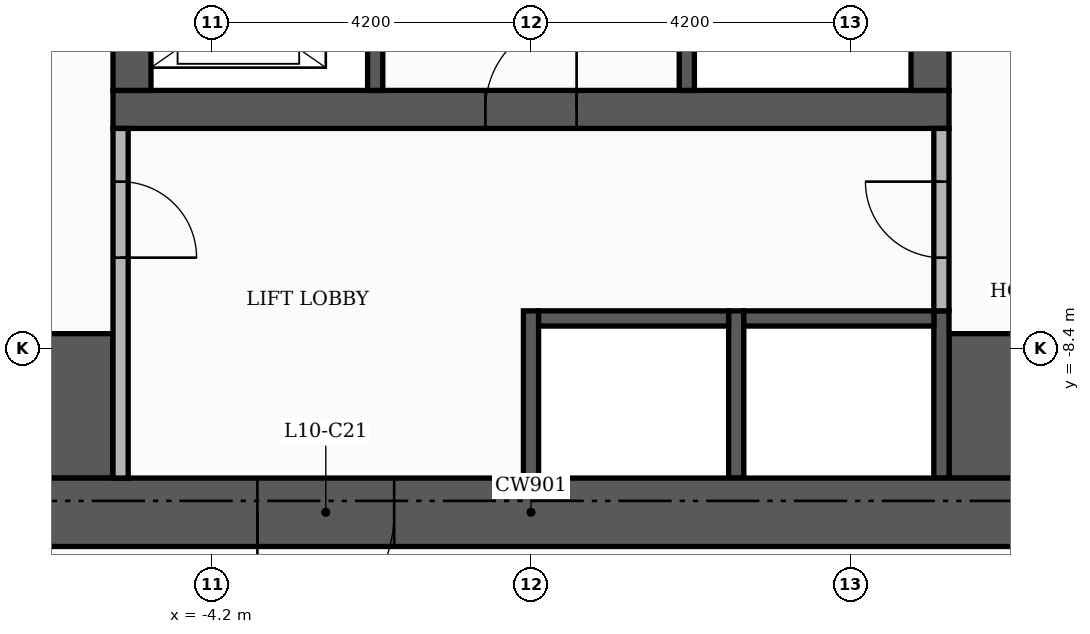
"""IFC4 building model, lengths in metres.
Left out: names, types, materials, properties, quantities, classifications, styles, units other than length and angle.
Written with IfcOpenShell. Run it as: python <this file> out.ifc"""

import sys

from ifc_helpers import new_model, si_unit, direction, frame, frame_2d, origin, place, context, subcontext, project, spatial, rectangle, extrude, element, fill, save


model = new_model("IFC4")
c1 = context("Model", 3, precision=1e-05, world=origin(), true_north=direction((0.0, 1.0)))
c2 = subcontext(c1, "Body", "Model", "MODEL_VIEW")
j1 = project(units=[si_unit("LENGTHUNIT", "METRE"), si_unit("PLANEANGLEUNIT", "RADIAN")], contexts=[c1])
p1 = place(None, origin())
s1 = spatial("IfcSite", under=j1, at=p1, CompositionType="ELEMENT")
p2 = place(p1, origin())
s2 = spatial("IfcBuilding", under=s1, at=p2, CompositionType="ELEMENT")
p3 = place(p2, frame((0.0, 0.0, 46.5)))
s3 = spatial("IfcBuildingStorey", under=s2, at=p3, CompositionType="ELEMENT", Elevation=46.5)
p4 = place(p3, frame((-5.5, -5.25, 0.0), z_axis=(0.0, 0.0, 1.0), x_axis=(1.0, 0.0, 0.0)))
e1 = element("IfcWall", 1, at=p4, inside=s3, PredefinedType="SHEAR", context=c2, shape_type="SweptSolid", body=[
    extrude(rectangle(XDim=11.0, YDim=0.5, at=frame_2d((5.5, 0.0))), origin(), (0.0, 0.0, 1.0), 3.48),
])
p5 = place(p4, frame((4.9, 0.0, 0.0)))
e2 = element("IfcOpeningElement", 2, at=p5, cuts=e1, PredefinedType="OPENING", context=c2, shape_type="SweptSolid", body=[
    extrude(rectangle(XDim=1.2, YDim=2.1, at=frame_2d((0.6, 1.05))), frame((0.0, 0.26, 0.0), z_axis=(0.0, -1.0, 0.0), x_axis=(1.0, 0.0, 0.0)), (0.0, 0.0, 1.0), 0.52),
])
for number, where, z_axis, x_axis in (
    (3, (-5.25, -5.0, 0.0), (0.0, 0.0, 1.0), (0.0, 1.0, 0.0)),
    (4, (5.25, -5.0, 0.0), (0.0, 0.0, 1.0), (0.0, 1.0, 0.0)),
):
    element("IfcWall", number, at=place(p3, frame(where, z_axis=z_axis, x_axis=x_axis)), inside=s3, PredefinedType="SHEAR", context=c2, shape_type="SweptSolid", body=[
        extrude(rectangle(XDim=10.5, YDim=0.5, at=frame_2d((5.25, 0.0))), origin(), (0.0, 0.0, 1.0), 3.48),
    ])
for number, where, z_axis, x_axis in (
    (5, (-10.1, -9.15, 0.0), (0.0, 0.0, 1.0), (1.0, 0.0, 0.0)),
    (6, (5.5, -9.15, 0.0), (0.0, 0.0, 1.0), (1.0, 0.0, 0.0)),
):
    element("IfcWall", number, at=place(p3, frame(where, z_axis=z_axis, x_axis=x_axis)), inside=s3, PredefinedType="SHEAR", context=c2, shape_type="SweptSolid", body=[
        extrude(rectangle(XDim=4.6, YDim=1.9, at=frame_2d((2.3, 0.0))), origin(), (0.0, 0.0, 1.0), 3.48),
    ])
p6 = place(p3, frame((2.05, -5.0, 0.0), z_axis=(0.0, 0.0, 1.0), x_axis=(0.0, 1.0, 0.0)))
e7 = element("IfcWall", 7, at=p6, inside=s3, PredefinedType="SHEAR", context=c2, shape_type="SweptSolid", body=[
    extrude(rectangle(XDim=6.6, YDim=0.2, at=frame_2d((3.3, 0.0))), origin(), (0.0, 0.0, 1.0), 3.48),
])
p7 = place(p6, frame((5.25, 0.0, 0.0)))
e8 = element("IfcOpeningElement", 8, at=p7, cuts=e7, PredefinedType="OPENING", context=c2, shape_type="SweptSolid", body=[
    extrude(rectangle(XDim=1.0, YDim=2.1, at=frame_2d((0.5, 1.05))), frame((0.0, 0.11, 0.0), z_axis=(0.0, -1.0, 0.0), x_axis=(1.0, 0.0, 0.0)), (0.0, 0.0, 1.0), 0.22),
])
for number, where, z_axis, x_axis in (
    (9, (0.0, -10.1, 0.0), (0.0, 0.0, 1.0), (0.0, 1.0, 0.0)),
    (10, (2.7, -10.1, 0.0), (0.0, 0.0, 1.0), (0.0, 1.0, 0.0)),
    (11, (5.4, -10.1, 0.0), (0.0, 0.0, 1.0), (0.0, 1.0, 0.0)),
):
    element("IfcWall", number, at=place(p3, frame(where, z_axis=z_axis, x_axis=x_axis)), inside=s3, PredefinedType="SHEAR", context=c2, shape_type="SweptSolid", body=[
        extrude(rectangle(XDim=2.2, YDim=0.2, at=frame_2d((1.1, 0.0))), origin(), (0.0, 0.0, 1.0), 3.48),
    ])
for number, where, z_axis, x_axis in (
    (12, (0.1, -8.0, 0.0), (0.0, 0.0, 1.0), (1.0, 0.0, 0.0)),
    (13, (2.8, -8.0, 0.0), (0.0, 0.0, 1.0), (1.0, 0.0, 0.0)),
):
    element("IfcWall", number, at=place(p3, frame(where, z_axis=z_axis, x_axis=x_axis)), inside=s3, PredefinedType="SHEAR", context=c2, shape_type="SweptSolid", body=[
        extrude(rectangle(XDim=2.5, YDim=0.2, at=frame_2d((1.25, 0.0))), origin(), (0.0, 0.0, 1.0), 3.48),
    ])
p8 = place(p3, frame((-2.05, -5.0, 0.0), z_axis=(0.0, 0.0, 1.0), x_axis=(0.0, 1.0, 0.0)))
e14 = element("IfcWall", 14, at=p8, inside=s3, PredefinedType="SHEAR", context=c2, shape_type="SweptSolid", body=[
    extrude(rectangle(XDim=3.4, YDim=0.2, at=frame_2d((1.7, 0.0))), origin(), (0.0, 0.0, 1.0), 3.48),
])
p9 = place(p8, frame((0.55, 0.0, 0.0)))
e15 = element("IfcOpeningElement", 15, at=p9, cuts=e14, PredefinedType="OPENING", context=c2, shape_type="SweptSolid", body=[
    extrude(rectangle(XDim=1.1, YDim=2.1, at=frame_2d((0.55, 1.05))), frame((0.0, 0.11, 0.0), z_axis=(0.0, -1.0, 0.0), x_axis=(1.0, 0.0, 0.0)), (0.0, 0.0, 1.0), 0.22),
])
p10 = place(p8, frame((2.45, 0.0, 0.0)))
e16 = element("IfcOpeningElement", 16, at=p10, cuts=e14, PredefinedType="OPENING", context=c2, shape_type="SweptSolid", body=[
    extrude(rectangle(XDim=0.8, YDim=2.1, at=frame_2d((0.4, 1.05))), frame((0.0, 0.11, 0.0), z_axis=(0.0, -1.0, 0.0), x_axis=(1.0, 0.0, 0.0)), (0.0, 0.0, 1.0), 0.22),
])
p11 = place(p3, frame((-11.0, -10.55, 0.0), z_axis=(0.0, 0.0, 1.0), x_axis=(1.0, 0.0, 0.0)))
e17 = element("IfcWall", 17, at=p11, inside=s3, PredefinedType="SHEAR", context=c2, shape_type="SweptSolid", body=[
    extrude(rectangle(XDim=22.0, YDim=0.9, at=frame_2d((11.0, 0.0))), origin(), (0.0, 0.0, 1.0), 3.48),
])
p12 = place(p11, frame((7.4, 0.0, 0.0)))
e18 = element("IfcOpeningElement", 18, at=p12, cuts=e17, PredefinedType="OPENING", context=c2, shape_type="SweptSolid", body=[
    extrude(rectangle(XDim=1.8, YDim=2.2, at=frame_2d((0.9, 1.1))), frame((0.0, 0.46, 0.0), z_axis=(0.0, -1.0, 0.0), x_axis=(1.0, 0.0, 0.0)), (0.0, 0.0, 1.0), 0.92),
])
p13 = place(p3, frame((-5.4, -10.1, 0.0), z_axis=(0.0, 0.0, 1.0), x_axis=(0.0, 1.0, 0.0)))
e19 = element("IfcWall", 19, at=p13, inside=s3, PredefinedType="PARTITIONING", context=c2, shape_type="SweptSolid", body=[
    extrude(rectangle(XDim=4.6, YDim=0.2, at=frame_2d((2.3, 0.0))), origin(), (0.0, 0.0, 1.0), 3.48),
])
p14 = place(p13, frame((2.9, 0.0, 0.0)))
e20 = element("IfcOpeningElement", 20, at=p14, cuts=e19, PredefinedType="OPENING", context=c2, shape_type="SweptSolid", body=[
    extrude(rectangle(XDim=1.0, YDim=2.1, at=frame_2d((0.5, 1.05))), frame((0.0, 0.11, 0.0), z_axis=(0.0, -1.0, 0.0), x_axis=(1.0, 0.0, 0.0)), (0.0, 0.0, 1.0), 0.22),
])
p15 = place(p3, frame((5.4, -7.9, 0.0), z_axis=(0.0, 0.0, 1.0), x_axis=(0.0, 1.0, 0.0)))
e21 = element("IfcWall", 21, at=p15, inside=s3, PredefinedType="PARTITIONING", context=c2, shape_type="SweptSolid", body=[
    extrude(rectangle(XDim=2.4, YDim=0.2, at=frame_2d((1.2, 0.0))), origin(), (0.0, 0.0, 1.0), 3.48),
])
p16 = place(p15, frame((0.7, 0.0, 0.0)))
e22 = element("IfcOpeningElement", 22, at=p16, cuts=e21, PredefinedType="OPENING", context=c2, shape_type="SweptSolid", body=[
    extrude(rectangle(XDim=1.0, YDim=2.1, at=frame_2d((0.5, 1.05))), frame((0.0, 0.11, 0.0), z_axis=(0.0, -1.0, 0.0), x_axis=(1.0, 0.0, 0.0)), (0.0, 0.0, 1.0), 0.22),
])
p17 = place(p5, origin())
e23 = element("IfcDoor", 23, at=p17, inside=s3, OperationType="SINGLE_SWING_RIGHT", PredefinedType="DOOR", context=c2, shape_type="SweptSolid", body=[
    extrude(rectangle(XDim=1.2, YDim=2.1, at=frame_2d((0.6, 1.05))), frame((0.0, 0.025, 0.0), z_axis=(0.0, -1.0, 0.0), x_axis=(1.0, 0.0, 0.0)), (0.0, 0.0, 1.0), 0.05),
])
fill(e2, e23)
p18 = place(p14, frame((1.0, 0.0, 0.0), z_axis=(0.0, 0.0, 1.0), x_axis=(-1.0, 0.0, 0.0)))
e24 = element("IfcDoor", 24, at=p18, inside=s3, OperationType="SINGLE_SWING_LEFT", PredefinedType="DOOR", context=c2, shape_type="SweptSolid", body=[
    extrude(rectangle(XDim=1.0, YDim=2.1, at=frame_2d((0.5, 1.05))), frame((0.0, 0.025, 0.0), z_axis=(0.0, -1.0, 0.0), x_axis=(1.0, 0.0, 0.0)), (0.0, 0.0, 1.0), 0.05),
])
fill(e20, e24)
p19 = place(p16, origin())
e25 = element("IfcDoor", 25, at=p19, inside=s3, OperationType="SINGLE_SWING_RIGHT", PredefinedType="DOOR", context=c2, shape_type="SweptSolid", body=[
    extrude(rectangle(XDim=1.0, YDim=2.1, at=frame_2d((0.5, 1.05))), frame((0.0, 0.025, 0.0), z_axis=(0.0, -1.0, 0.0), x_axis=(1.0, 0.0, 0.0)), (0.0, 0.0, 1.0), 0.05),
])
fill(e22, e25)
p20 = place(p12, frame((1.8, 0.0, 0.0), z_axis=(0.0, 0.0, 1.0), x_axis=(-1.0, 0.0, 0.0)))
e26 = element("IfcDoor", 26, at=p20, inside=s3, OperationType="DOUBLE_DOOR_SINGLE_SWING", PredefinedType="DOOR", context=c2, shape_type="SweptSolid", body=[
    extrude(rectangle(XDim=1.8, YDim=2.2, at=frame_2d((0.9, 1.1))), frame((0.0, 0.025, 0.0), z_axis=(0.0, -1.0, 0.0), x_axis=(1.0, 0.0, 0.0)), (0.0, 0.0, 1.0), 0.05),
])
fill(e18, e26)
save(model, sys.argv[1])
